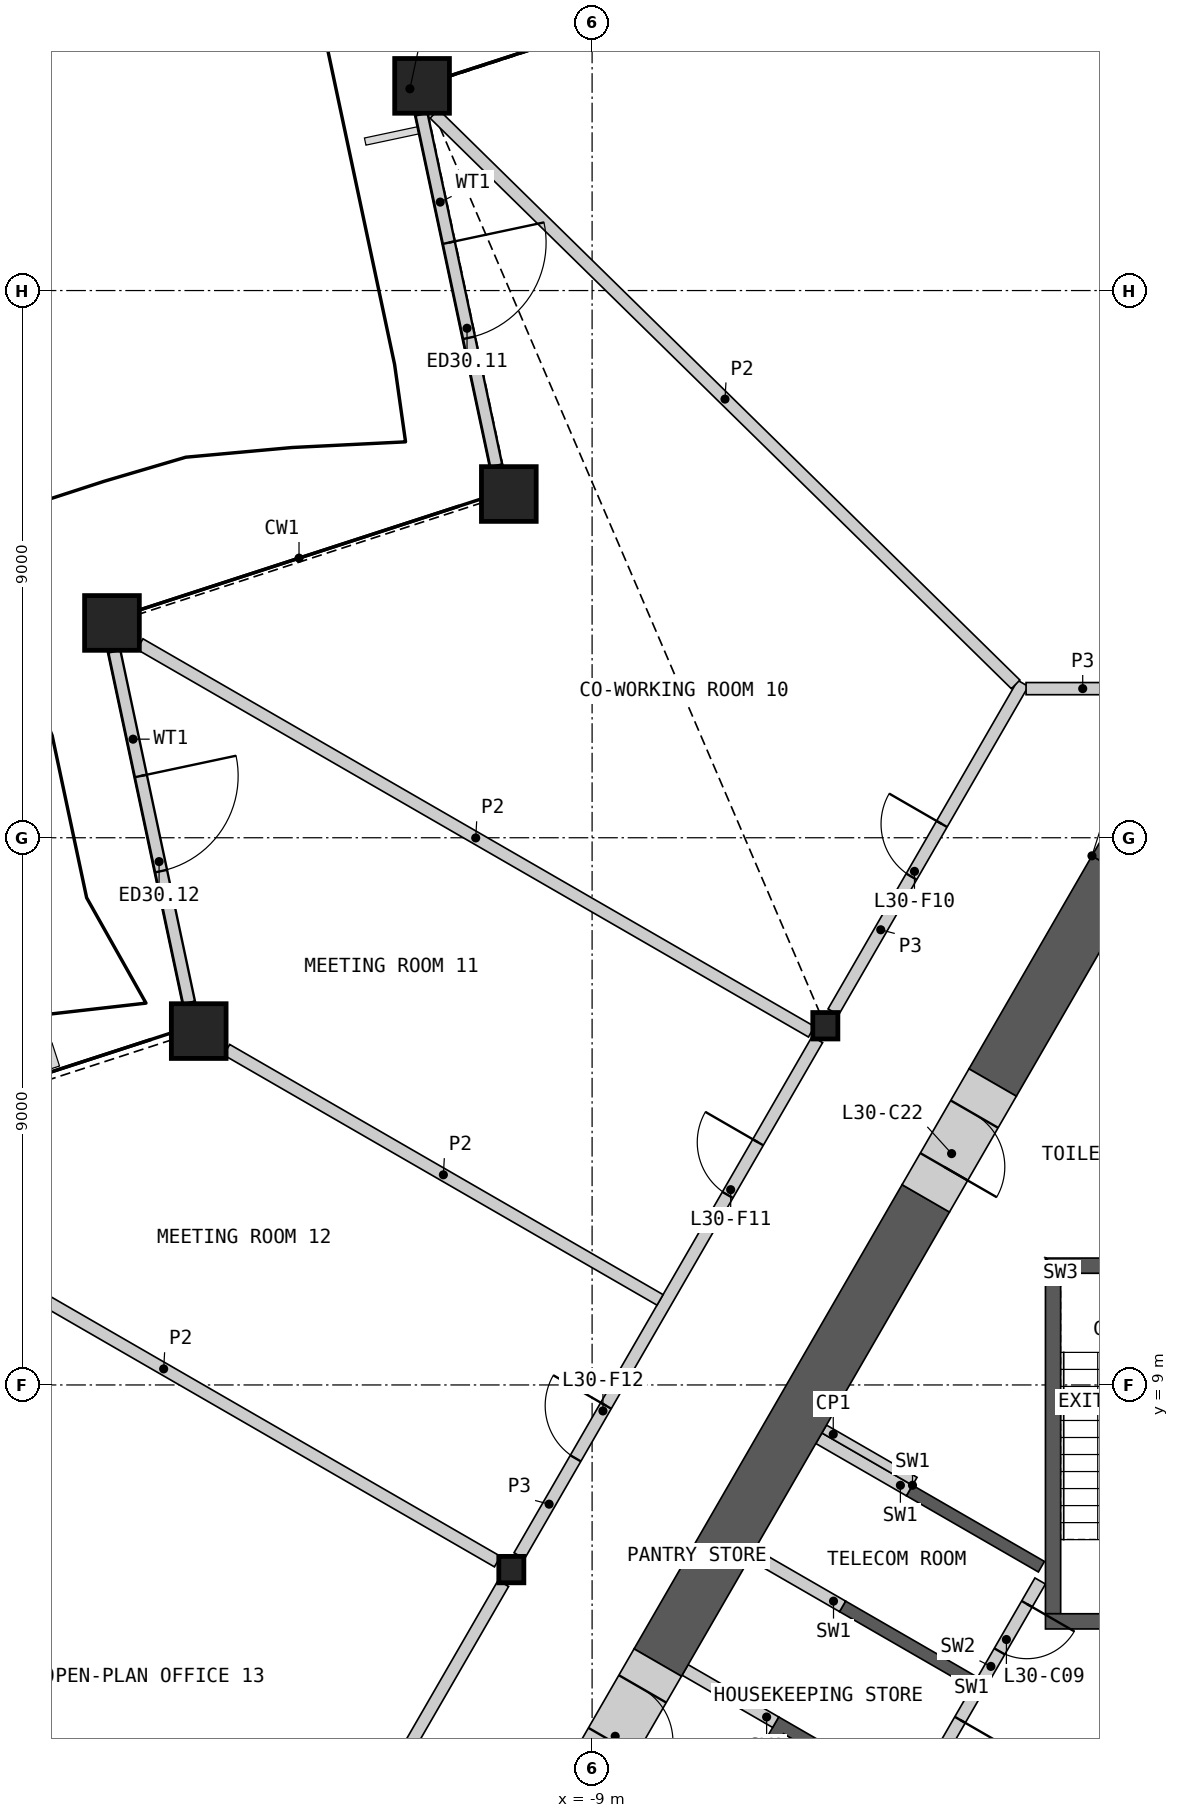
"""IFC4 building model, lengths in metres.
Left out: names, types, materials, properties, quantities, classifications, styles, units other than length and angle.
Written with IfcOpenShell. Run it as: python <this file> out.ifc"""

import sys

from ifc_helpers import new_model, si_unit, direction, frame, frame_2d, origin, origin_2d, place, context, subcontext, project, spatial, polyline, rectangle, hollow_rectangle, i_section, outline, extrude, element, fill, save


model = new_model("IFC4")
c1 = context("Model", 3, precision=1e-05, world=origin(), true_north=direction((0.0, 1.0)))
c2 = subcontext(c1, "Body", "Model", "MODEL_VIEW")
j1 = project(units=[si_unit("LENGTHUNIT", "METRE"), si_unit("PLANEANGLEUNIT", "RADIAN")], contexts=[c1])
p1 = place(None, origin())
s1 = spatial("IfcSite", under=j1, at=p1, CompositionType="ELEMENT")
p2 = place(p1, origin())
s2 = spatial("IfcBuilding", under=s1, at=p2, CompositionType="ELEMENT")
p3 = place(p2, frame((0.0, 0.0, 141.6)))
s3 = spatial("IfcBuildingStorey", under=s2, at=p3, CompositionType="ELEMENT", Elevation=141.6)
for number, where, z_axis, x_axis in (
    (1, (-11.796, 30.366, 0.0), (0.0, 0.0, 1.0), (1.0, 0.0, 0.0)),
    (2, (-10.37, 23.654, 0.0), (0.0, 0.0, 1.0), (1.0, 0.0, 0.0)),
    (3, (-16.896, 21.533, 0.0), (0.0, 0.0, 1.0), (1.0, 0.0, 0.0)),
    (4, (-15.469, 14.82, 0.0), (0.0, 0.0, 1.0), (1.0, 0.0, 0.0)),
):
    element("IfcColumn", number, at=place(p3, frame(where, z_axis=z_axis, x_axis=x_axis)), inside=s3, PredefinedType="COLUMN", context=c2, shape_type="SweptSolid", body=[
        extrude(hollow_rectangle(XDim=0.9, YDim=0.9, WallThickness=0.06, at=origin_2d()), origin(), (0.0, 0.0, 1.0), 4.2),
    ])
for number, where, z_axis, x_axis in (
    (5, (-5.164, 14.908, 0.0), (0.0, 0.0, 1.0), (1.0, 0.0, 0.0)),
    (6, (-10.328, 5.963, 0.0), (0.0, 0.0, 1.0), (1.0, 0.0, 0.0)),
):
    element("IfcColumn", number, at=place(p3, frame(where, z_axis=z_axis, x_axis=x_axis)), inside=s3, PredefinedType="COLUMN", context=c2, shape_type="SweptSolid", body=[
        extrude(i_section(OverallWidth=0.412, OverallDepth=0.435, WebThickness=0.036, FlangeThickness=0.057, at=origin_2d()), origin(), (0.0, 0.0, 1.0), 4.2),
    ])
p4 = place(p3, frame((-11.805, 29.9, 0.0), z_axis=(0.0, 0.0, 1.0), x_axis=(0.207917562075, -0.978146352741, 0.0)))
e7 = element("IfcWall", 7, at=p4, inside=s3, PredefinedType="SOLIDWALL", context=c2, shape_type="SweptSolid", body=[
    extrude(rectangle(XDim=5.909, YDim=0.2, at=frame_2d((2.954, 0.0))), origin(), (0.0, 0.0, 1.0), 3.189),
])
p5 = place(p4, frame((2.158, 0.0, 0.0)))
e8 = element("IfcOpeningElement", 8, at=p5, cuts=e7, PredefinedType="OPENING", context=c2, shape_type="SweptSolid", body=[
    extrude(rectangle(XDim=1.6, YDim=2.4, at=frame_2d((0.8, 1.2))), frame((0.0, 0.11, 0.0), z_axis=(0.0, -1.0, 0.0), x_axis=(1.0, 0.0, 0.0)), (0.0, 0.0, 1.0), 0.22),
])
p6 = place(p3, frame((-16.857, 21.066, 0.0), z_axis=(0.0, 0.0, 1.0), x_axis=(0.207917562075, -0.978146352741, 0.0)))
e9 = element("IfcWall", 9, at=p6, inside=s3, PredefinedType="SOLIDWALL", context=c2, shape_type="SweptSolid", body=[
    extrude(rectangle(XDim=5.909, YDim=0.2, at=frame_2d((2.954, 0.0))), origin(), (0.0, 0.0, 1.0), 3.189),
])
p7 = place(p6, frame((2.096, 0.0, 0.0)))
e10 = element("IfcOpeningElement", 10, at=p7, cuts=e9, PredefinedType="OPENING", context=c2, shape_type="SweptSolid", body=[
    extrude(rectangle(XDim=1.6, YDim=2.4, at=frame_2d((0.8, 1.2))), frame((0.0, 0.11, 0.0), z_axis=(0.0, -1.0, 0.0), x_axis=(1.0, 0.0, 0.0)), (0.0, 0.0, 1.0), 0.22),
])
p8 = place(p3, origin())
e11 = element("IfcWall", 11, at=p8, inside=s3, PredefinedType="SHEAR", context=c2, shape_type="SweptSolid", body=[
    extrude(outline(polyline([(-4.96, 0.208), (-7.131, 1.461), (-5.931, 3.54), (-3.76, 2.287), (-3.861, 2.113), (-5.852, 3.263), (-6.852, 1.531), (-4.861, 0.381), (-4.96, 0.208)])), origin(), (0.0, 0.0, 1.0), 3.8),
])
p9 = place(p3, origin())
e12 = element("IfcWall", 12, at=p9, inside=s3, PredefinedType="SHEAR", context=c2, shape_type="SweptSolid", body=[
    extrude(outline(polyline([(-2.76, 4.019), (-4.931, 5.272), (-4.831, 5.445), (-2.66, 4.192), (-2.76, 4.019)])), origin(), (0.0, 0.0, 1.0), 3.8),
])
p10 = place(p3, origin())
e13 = element("IfcWall", 13, at=p10, inside=s3, PredefinedType="SHEAR", context=c2, shape_type="SweptSolid", body=[
    extrude(outline(polyline([(-3.731, 7.35), (-1.561, 6.097), (-1.66, 5.924), (-3.831, 7.177), (-3.731, 7.35)])), origin(), (0.0, 0.0, 1.0), 3.8),
])
p11 = place(p3, frame((-1.631, 5.776, 0.0), z_axis=(0.0, 0.0, 1.0), x_axis=(-0.499992876559, -0.866029516466, 0.0)))
e14 = element("IfcWall", 14, at=p11, inside=s3, PredefinedType="SOLIDWALL", context=c2, shape_type="SweptSolid", body=[
    extrude(rectangle(XDim=6.486, YDim=0.2, at=frame_2d((3.243, 0.0))), origin(), (0.0, 0.0, 1.0), 3.8),
])
p12 = place(p11, frame((0.437, 0.0, 0.0)))
e15 = element("IfcOpeningElement", 15, at=p12, cuts=e14, PredefinedType="OPENING", context=c2, shape_type="SweptSolid", body=[
    extrude(rectangle(XDim=0.9, YDim=2.1, at=frame_2d((0.45, 1.05))), frame((0.0, 0.11, 0.0), z_axis=(0.0, -1.0, 0.0), x_axis=(1.0, 0.0, 0.0)), (0.0, 0.0, 1.0), 0.22),
])
p13 = place(p11, frame((2.637, 0.0, 0.0)))
e16 = element("IfcOpeningElement", 16, at=p13, cuts=e14, PredefinedType="OPENING", context=c2, shape_type="SweptSolid", body=[
    extrude(rectangle(XDim=0.9, YDim=2.1, at=frame_2d((0.45, 1.05))), frame((0.0, 0.11, 0.0), z_axis=(0.0, -1.0, 0.0), x_axis=(1.0, 0.0, 0.0)), (0.0, 0.0, 1.0), 0.22),
])
for number, where, z_axis, x_axis in (
    (17, (-3.781, 7.263, 0.0), (0.0, 0.0, 1.0), (-0.866, 0.5, 0.0)),
    (18, (-4.881, 5.358, 0.0), (0.0, 0.0, 1.0), (-0.866, 0.5, 0.0)),
):
    element("IfcWall", number, at=place(p3, frame(where, z_axis=z_axis, x_axis=x_axis)), inside=s3, PredefinedType="SHEAR", context=c2, shape_type="SweptSolid", body=[
        extrude(rectangle(XDim=1.72, YDim=0.2, at=frame_2d((0.86, 0.0))), origin(), (0.0, 0.0, 1.0), 3.8),
    ])
p14 = place(p3, frame((-5.981, 3.453, 0.0), z_axis=(0.0, 0.0, 1.0), x_axis=(-0.866060346521, 0.499939472521, 0.0)))
e19 = element("IfcWall", 19, at=p14, inside=s3, PredefinedType="SHEAR", context=c2, shape_type="SweptSolid", body=[
    extrude(rectangle(XDim=1.72, YDim=0.2, at=frame_2d((0.86, 0.0))), origin(), (0.0, 0.0, 1.0), 3.8),
])
p15 = place(p3, origin())
e20 = element("IfcWall", 20, at=p15, inside=s3, PredefinedType="SHEAR", context=c2, shape_type="SweptSolid", body=[
    extrude(outline(polyline([(1.544, 11.087), (-1.544, 11.087), (-1.294, 10.837), (1.294, 10.837), (1.544, 11.087)])), origin(), (0.0, 0.0, 1.0), 3.8),
])
p16 = place(p3, origin())
e21 = element("IfcWall", 21, at=p16, inside=s3, PredefinedType="SHEAR", context=c2, shape_type="SweptSolid", body=[
    extrude(outline(polyline([(-1.294, 10.837), (-1.544, 11.087), (-1.544, 5.237), (-1.294, 5.237), (-1.294, 10.837)])), origin(), (0.0, 0.0, 1.0), 3.8),
])
p17 = place(p3, frame((1.544, 5.112, 0.0), z_axis=(0.0, 0.0, 1.0), x_axis=(-1.0, 0.0, 0.0)))
e22 = element("IfcWall", 22, at=p17, inside=s3, PredefinedType="SHEAR", context=c2, shape_type="SweptSolid", body=[
    extrude(rectangle(XDim=3.088, YDim=0.25, at=frame_2d((1.544, 0.0))), origin(), (0.0, 0.0, 1.0), 3.8),
])
p18 = place(p17, frame((0.994, 0.0, 0.0)))
e23 = element("IfcOpeningElement", 23, at=p18, cuts=e22, PredefinedType="OPENING", context=c2, shape_type="SweptSolid", body=[
    extrude(rectangle(XDim=1.1, YDim=2.1, at=frame_2d((0.55, 1.05))), frame((0.0, 0.135, 0.0), z_axis=(0.0, -1.0, 0.0), x_axis=(1.0, 0.0, 0.0)), (0.0, 0.0, 1.0), 0.27),
])
p19 = place(p3, frame((-3.693, 7.415, 0.0), z_axis=(0.0, 0.0, 1.0), x_axis=(-0.866024871741, 0.500000921525, 0.0)))
e24 = element("IfcWall", 24, at=p19, inside=s3, PredefinedType="PARTITIONING", context=c2, shape_type="SweptSolid", body=[
    extrude(rectangle(XDim=1.72, YDim=0.15, at=frame_2d((0.86, 0.0))), origin(), (0.0, 0.0, 1.0), 3.8),
])
p20 = place(p3, frame((-3.512, 12.069, 0.0), z_axis=(0.0, 0.0, 1.0), x_axis=(-0.500002126466, -0.866024176065, 0.0)))
e25 = element("IfcWall", 25, at=p20, inside=s3, PredefinedType="SHEAR", context=c2, shape_type="SweptSolid", body=[
    extrude(rectangle(XDim=8.816, YDim=0.9, at=frame_2d((4.408, 0.0))), origin(), (0.0, 0.0, 1.0), 3.8),
])
p21 = place(p3, frame((-0.39, 17.478, 0.0), z_axis=(0.0, 0.0, 1.0), x_axis=(-0.500046330384, -0.865998653272, 0.0)))
e26 = element("IfcWall", 26, at=p21, inside=s3, PredefinedType="SHEAR", context=c2, shape_type="SweptSolid", body=[
    extrude(rectangle(XDim=4.045, YDim=0.9, at=frame_2d((2.023, 0.0))), origin(), (0.0, 0.0, 1.0), 3.8),
])
p22 = place(p3, origin())
e27 = element("IfcWall", 27, at=p22, inside=s3, PredefinedType="SHEAR", context=c2, shape_type="SweptSolid", body=[
    extrude(outline(polyline([(-0.779, 17.703), (0.0, 19.052), (0.779, 17.703), (0.0, 17.253), (-0.779, 17.703)])), origin(), (0.0, 0.0, 1.0), 3.8),
])
p23 = place(p3, frame((-7.92, 4.434, 0.0), z_axis=(0.0, 0.0, 1.0), x_axis=(-0.499939227269, -0.866060488094, 0.0)))
e28 = element("IfcWall", 28, at=p23, inside=s3, PredefinedType="SHEAR", context=c2, shape_type="SweptSolid", body=[
    extrude(rectangle(XDim=2.08, YDim=0.9, at=frame_2d((1.04, 0.0))), origin(), (0.0, 0.0, 1.0), 3.8),
])
p24 = place(p23, frame((0.5, 0.0, 0.0)))
e29 = element("IfcOpeningElement", 29, at=p24, cuts=e28, PredefinedType="OPENING", context=c2, shape_type="SweptSolid", body=[
    extrude(rectangle(XDim=1.0, YDim=2.1, at=frame_2d((0.5, 1.05))), frame((0.0, 0.46, 0.0), z_axis=(0.0, -1.0, 0.0), x_axis=(1.0, 0.0, 0.0)), (0.0, 0.0, 1.0), 0.92),
])
p25 = place(p3, frame((-2.413, 13.974, 0.0), z_axis=(0.0, 0.0, 1.0), x_axis=(-0.499946605688, -0.86605622881, 0.0)))
e30 = element("IfcWall", 30, at=p25, inside=s3, PredefinedType="SHEAR", context=c2, shape_type="SweptSolid", body=[
    extrude(rectangle(XDim=2.2, YDim=0.9, at=frame_2d((1.1, 0.0))), origin(), (0.0, 0.0, 1.0), 3.8),
])
p26 = place(p25, frame((0.6, 0.0, 0.0)))
e31 = element("IfcOpeningElement", 31, at=p26, cuts=e30, PredefinedType="OPENING", context=c2, shape_type="SweptSolid", body=[
    extrude(rectangle(XDim=1.0, YDim=2.1, at=frame_2d((0.5, 1.05))), frame((0.0, 0.46, 0.0), z_axis=(0.0, -1.0, 0.0), x_axis=(1.0, 0.0, 0.0)), (0.0, 0.0, 1.0), 0.92),
])
p27 = place(p3, frame((-15.361, -2.754, 0.0), z_axis=(0.0, 0.0, 1.0), x_axis=(0.500004141693, 0.866023012564, 0.0)))
e32 = element("IfcWall", 32, at=p27, inside=s3, PredefinedType="PARTITIONING", context=c2, shape_type="SweptSolid", body=[
    extrude(rectangle(XDim=9.803, YDim=0.2, at=frame_2d((4.902, 0.0))), origin(), (0.0, 0.0, 1.0), 3.8),
])
p28 = place(p27, frame((4.452, 0.0, 0.0)))
e33 = element("IfcOpeningElement", 33, at=p28, cuts=e32, PredefinedType="OPENING", context=c2, shape_type="SweptSolid", body=[
    extrude(rectangle(XDim=1.0, YDim=2.1, at=frame_2d((0.5, 1.05))), frame((0.0, 0.11, 0.0), z_axis=(0.0, -1.0, 0.0), x_axis=(1.0, 0.0, 0.0)), (0.0, 0.0, 1.0), 0.22),
])
p29 = place(p3, frame((-10.197, 6.19, 0.0), z_axis=(0.0, 0.0, 1.0), x_axis=(0.500012035596, 0.866018454918, 0.0)))
e34 = element("IfcWall", 34, at=p29, inside=s3, PredefinedType="PARTITIONING", context=c2, shape_type="SweptSolid", body=[
    extrude(rectangle(XDim=9.803, YDim=0.2, at=frame_2d((4.902, 0.0))), origin(), (0.0, 0.0, 1.0), 3.8),
])
p30 = place(p29, frame((6.853, 0.0, 0.0)))
e35 = element("IfcOpeningElement", 35, at=p30, cuts=e34, PredefinedType="OPENING", context=c2, shape_type="SweptSolid", body=[
    extrude(rectangle(XDim=1.0, YDim=2.1, at=frame_2d((0.5, 1.05))), frame((0.0, 0.11, 0.0), z_axis=(0.0, -1.0, 0.0), x_axis=(1.0, 0.0, 0.0)), (0.0, 0.0, 1.0), 0.22),
])
p31 = place(p29, frame((1.851, 0.0, 0.0)))
e36 = element("IfcOpeningElement", 36, at=p31, cuts=e34, PredefinedType="OPENING", context=c2, shape_type="SweptSolid", body=[
    extrude(rectangle(XDim=1.0, YDim=2.1, at=frame_2d((0.5, 1.05))), frame((0.0, 0.11, 0.0), z_axis=(0.0, -1.0, 0.0), x_axis=(1.0, 0.0, 0.0)), (0.0, 0.0, 1.0), 0.22),
])
p32 = place(p3, frame((-5.033, 15.135, 0.0), z_axis=(0.0, 0.0, 1.0), x_axis=(0.499980978912, 0.866036385336, 0.0)))
e37 = element("IfcWall", 37, at=p32, inside=s3, PredefinedType="PARTITIONING", context=c2, shape_type="SweptSolid", body=[
    extrude(rectangle(XDim=6.24, YDim=0.2, at=frame_2d((3.12, 0.0))), origin(), (0.0, 0.0, 1.0), 3.8),
])
p33 = place(p32, frame((2.57, 0.0, 0.0)))
e38 = element("IfcOpeningElement", 38, at=p33, cuts=e37, PredefinedType="OPENING", context=c2, shape_type="SweptSolid", body=[
    extrude(rectangle(XDim=1.0, YDim=2.1, at=frame_2d((0.5, 1.05))), frame((0.0, 0.11, 0.0), z_axis=(0.0, -1.0, 0.0), x_axis=(1.0, 0.0, 0.0)), (0.0, 0.0, 1.0), 0.22),
])
p34 = place(p3, frame((-1.863, 20.453, 0.0), z_axis=(0.0, 0.0, 1.0), x_axis=(1.0, 0.0, 0.0)))
e39 = element("IfcWall", 39, at=p34, inside=s3, PredefinedType="PARTITIONING", context=c2, shape_type="SweptSolid", body=[
    extrude(rectangle(XDim=3.726, YDim=0.2, at=frame_2d((1.863, 0.0))), origin(), (0.0, 0.0, 1.0), 3.8),
])
p35 = place(p34, frame((1.363, 0.0, 0.0)))
e40 = element("IfcOpeningElement", 40, at=p35, cuts=e39, PredefinedType="OPENING", context=c2, shape_type="SweptSolid", body=[
    extrude(rectangle(XDim=1.0, YDim=2.1, at=frame_2d((0.5, 1.05))), frame((0.0, 0.11, 0.0), z_axis=(0.0, -1.0, 0.0), x_axis=(1.0, 0.0, 0.0)), (0.0, 0.0, 1.0), 0.22),
])
p36 = place(p3, frame((-11.594, 29.906, 0.0), z_axis=(0.0, 0.0, 1.0), x_axis=(0.713664516359, -0.700487657343, 0.0)))
e41 = element("IfcWall", 41, at=p36, inside=s3, PredefinedType="PARTITIONING", context=c2, shape_type="SweptSolid", body=[
    extrude(rectangle(XDim=13.396, YDim=0.2, at=frame_2d((6.698, 0.0))), origin(), (0.0, 0.0, 1.0), 2.885),
])
p37 = place(p3, frame((-26.636, 3.682, 0.0), z_axis=(0.0, 0.0, 1.0), x_axis=(0.866026411352, -0.499998254837, 0.0)))
e42 = element("IfcWall", 42, at=p37, inside=s3, PredefinedType="PARTITIONING", context=c2, shape_type="SweptSolid", body=[
    extrude(rectangle(XDim=12.873, YDim=0.2, at=frame_2d((6.437, 0.0))), origin(), (0.0, 0.0, 1.0), 2.885),
])
p38 = place(p3, frame((-16.436, 21.186, 0.0), z_axis=(0.0, 0.0, 1.0), x_axis=(0.866023321739, -0.500003606191, 0.0)))
e43 = element("IfcWall", 43, at=p38, inside=s3, PredefinedType="PARTITIONING", context=c2, shape_type="SweptSolid", body=[
    extrude(rectangle(XDim=12.753, YDim=0.2, at=frame_2d((6.377, 0.0))), origin(), (0.0, 0.0, 1.0), 2.885),
])
p39 = place(p3, frame((-21.536, 12.434, 0.0), z_axis=(0.0, 0.0, 1.0), x_axis=(0.86602461759, -0.500001361726, 0.0)))
e44 = element("IfcWall", 44, at=p39, inside=s3, PredefinedType="PARTITIONING", context=c2, shape_type="SweptSolid", body=[
    extrude(rectangle(XDim=12.679, YDim=0.2, at=frame_2d((6.34, 0.0))), origin(), (0.0, 0.0, 1.0), 2.885),
])
p40 = place(p3, frame((-15.01, 14.514, 0.0), z_axis=(0.0, 0.0, 1.0), x_axis=(0.866018103232, -0.500012644715, 0.0)))
e45 = element("IfcWall", 45, at=p40, inside=s3, PredefinedType="PARTITIONING", context=c2, shape_type="SweptSolid", body=[
    extrude(rectangle(XDim=8.229, YDim=0.2, at=frame_2d((4.115, 0.0))), origin(), (0.0, 0.0, 1.0), 2.885),
])
p41 = place(p5, origin())
e46 = element("IfcDoor", 46, at=p41, inside=s3, OperationType="DOUBLE_DOOR_SINGLE_SWING", PredefinedType="DOOR", context=c2, shape_type="SweptSolid", body=[
    extrude(rectangle(XDim=1.6, YDim=2.4, at=frame_2d((0.8, 1.2))), frame((0.0, 0.025, 0.0), z_axis=(0.0, -1.0, 0.0), x_axis=(1.0, 0.0, 0.0)), (0.0, 0.0, 1.0), 0.05),
])
fill(e8, e46)
p42 = place(p7, origin())
e47 = element("IfcDoor", 47, at=p42, inside=s3, OperationType="DOUBLE_DOOR_SINGLE_SWING", PredefinedType="DOOR", context=c2, shape_type="SweptSolid", body=[
    extrude(rectangle(XDim=1.6, YDim=2.4, at=frame_2d((0.8, 1.2))), frame((0.0, 0.025, 0.0), z_axis=(0.0, -1.0, 0.0), x_axis=(1.0, 0.0, 0.0)), (0.0, 0.0, 1.0), 0.05),
])
fill(e10, e47)
p43 = place(p12, origin())
e48 = element("IfcDoor", 48, at=p43, inside=s3, OperationType="SINGLE_SWING_LEFT", PredefinedType="DOOR", context=c2, shape_type="SweptSolid", body=[
    extrude(rectangle(XDim=0.9, YDim=2.1, at=frame_2d((0.45, 1.05))), frame((0.0, 0.025, 0.0), z_axis=(0.0, -1.0, 0.0), x_axis=(1.0, 0.0, 0.0)), (0.0, 0.0, 1.0), 0.05),
])
fill(e15, e48)
p44 = place(p13, origin())
e49 = element("IfcDoor", 49, at=p44, inside=s3, OperationType="SINGLE_SWING_LEFT", PredefinedType="DOOR", context=c2, shape_type="SweptSolid", body=[
    extrude(rectangle(XDim=0.9, YDim=2.1, at=frame_2d((0.45, 1.05))), frame((0.0, 0.025, 0.0), z_axis=(0.0, -1.0, 0.0), x_axis=(1.0, 0.0, 0.0)), (0.0, 0.0, 1.0), 0.05),
])
fill(e16, e49)
p45 = place(p24, origin())
e50 = element("IfcDoor", 50, at=p45, inside=s3, OperationType="SINGLE_SWING_RIGHT", PredefinedType="DOOR", context=c2, shape_type="SweptSolid", body=[
    extrude(rectangle(XDim=1.0, YDim=2.1, at=frame_2d((0.5, 1.05))), frame((0.0, 0.205, 0.0), z_axis=(0.0, -1.0, 0.0), x_axis=(1.0, 0.0, 0.0)), (0.0, 0.0, 1.0), 0.05),
])
fill(e29, e50)
p46 = place(p26, origin())
e51 = element("IfcDoor", 51, at=p46, inside=s3, OperationType="SINGLE_SWING_RIGHT", PredefinedType="DOOR", context=c2, shape_type="SweptSolid", body=[
    extrude(rectangle(XDim=1.0, YDim=2.1, at=frame_2d((0.5, 1.05))), frame((0.0, 0.205, 0.0), z_axis=(0.0, -1.0, 0.0), x_axis=(1.0, 0.0, 0.0)), (0.0, 0.0, 1.0), 0.05),
])
fill(e31, e51)
p47 = place(p33, origin())
e52 = element("IfcDoor", 52, at=p47, inside=s3, OperationType="SINGLE_SWING_RIGHT", PredefinedType="DOOR", context=c2, shape_type="SweptSolid", body=[
    extrude(rectangle(XDim=1.0, YDim=2.1, at=frame_2d((0.5, 1.05))), frame((0.0, 0.025, 0.0), z_axis=(0.0, -1.0, 0.0), x_axis=(1.0, 0.0, 0.0)), (0.0, 0.0, 1.0), 0.05),
])
fill(e38, e52)
p48 = place(p30, origin())
e53 = element("IfcDoor", 53, at=p48, inside=s3, OperationType="SINGLE_SWING_RIGHT", PredefinedType="DOOR", context=c2, shape_type="SweptSolid", body=[
    extrude(rectangle(XDim=1.0, YDim=2.1, at=frame_2d((0.5, 1.05))), frame((0.0, 0.025, 0.0), z_axis=(0.0, -1.0, 0.0), x_axis=(1.0, 0.0, 0.0)), (0.0, 0.0, 1.0), 0.05),
])
fill(e35, e53)
p49 = place(p31, origin())
e54 = element("IfcDoor", 54, at=p49, inside=s3, OperationType="SINGLE_SWING_RIGHT", PredefinedType="DOOR", context=c2, shape_type="SweptSolid", body=[
    extrude(rectangle(XDim=1.0, YDim=2.1, at=frame_2d((0.5, 1.05))), frame((0.0, 0.025, 0.0), z_axis=(0.0, -1.0, 0.0), x_axis=(1.0, 0.0, 0.0)), (0.0, 0.0, 1.0), 0.05),
])
fill(e36, e54)
save(model, sys.argv[1])
